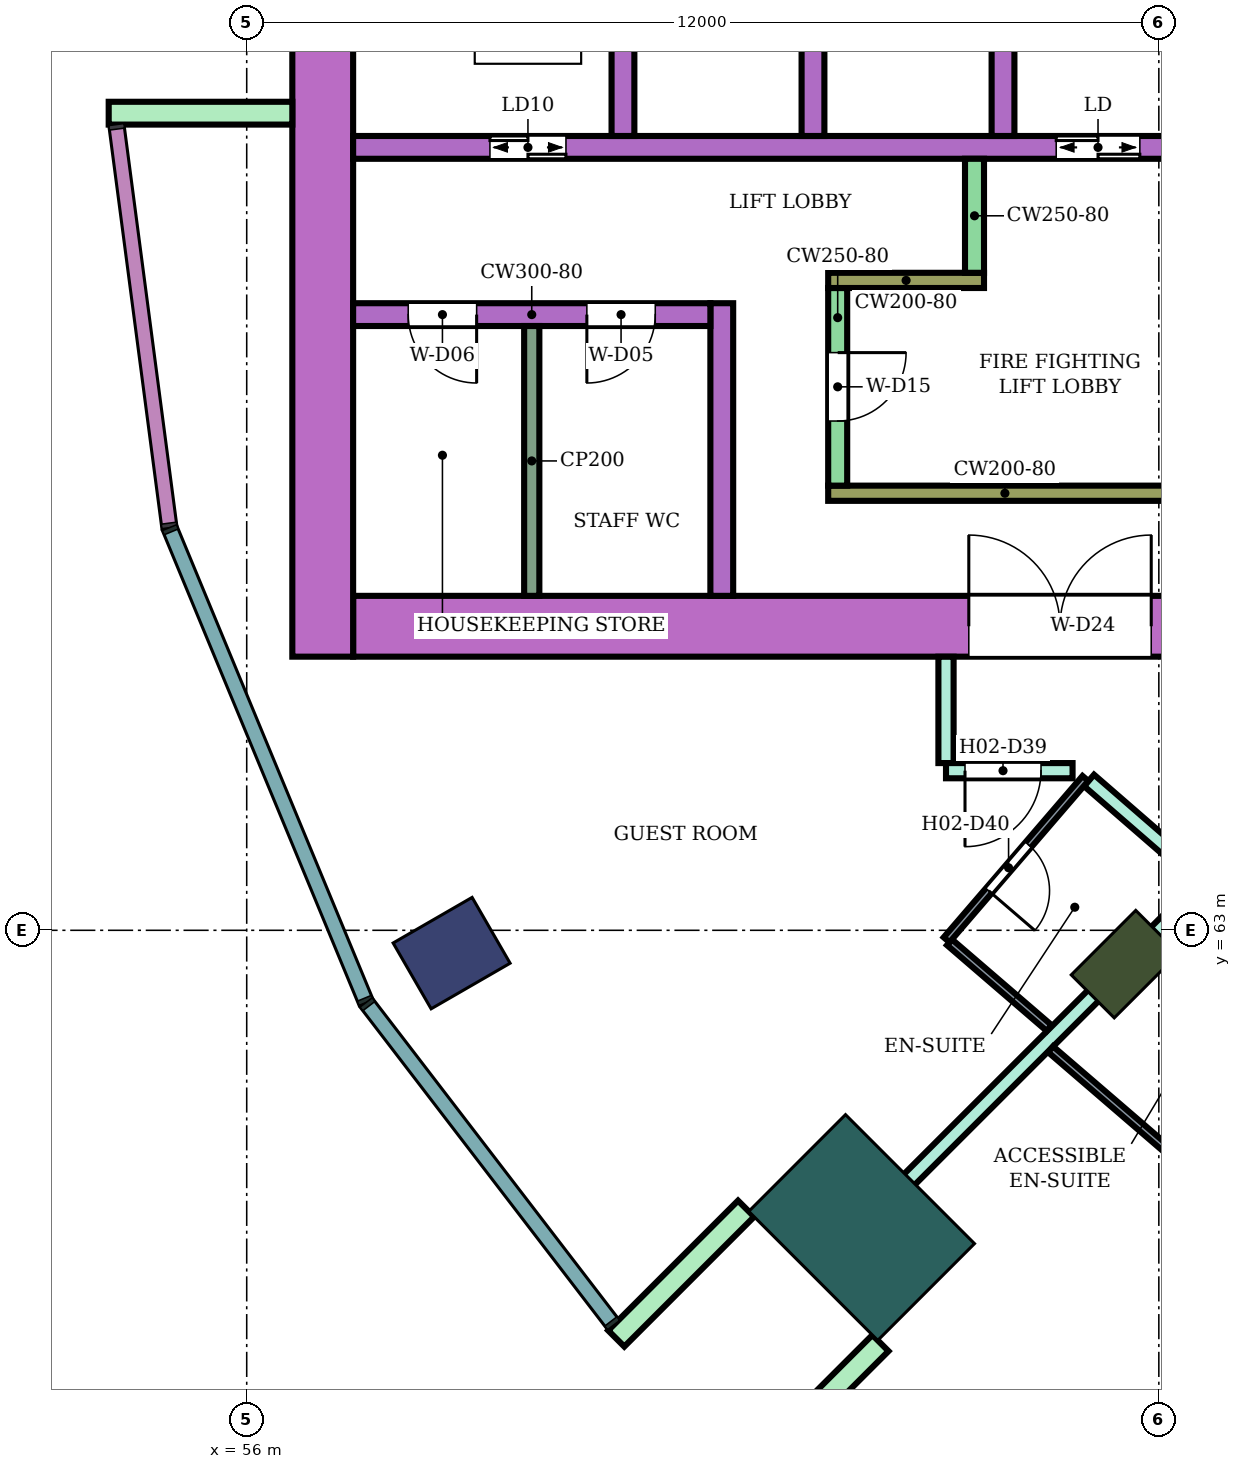
"""IFC4 building model, lengths in metres.
Left out: names, types, materials, properties, quantities, classifications, styles, units other than length and angle.
Written with IfcOpenShell. Run it as: python <this file> out.ifc"""

import sys

from ifc_helpers import new_model, si_unit, direction, frame, frame_2d, origin, origin_2d, place, context, subcontext, project, spatial, rectangle, extrude, element, fill, save


model = new_model("IFC4")
c1 = context("Model", 3, precision=1e-05, world=origin(), true_north=direction((0.0, 1.0)))
c2 = subcontext(c1, "Body", "Model", "MODEL_VIEW")
j1 = project(units=[si_unit("LENGTHUNIT", "METRE"), si_unit("PLANEANGLEUNIT", "RADIAN")], contexts=[c1])
p1 = place(None, origin())
s1 = spatial("IfcSite", under=j1, at=p1, CompositionType="ELEMENT")
p2 = place(p1, origin())
s2 = spatial("IfcBuilding", under=s1, at=p2, CompositionType="ELEMENT")
p3 = place(p2, frame((0.0, 0.0, 44.0)))
s3 = spatial("IfcBuildingStorey", under=s2, at=p3, CompositionType="ELEMENT", Elevation=44.0)
p4 = place(p3, frame((58.696, 62.7, 0.0), z_axis=(0.0, 0.0, 1.0), x_axis=(-0.866025403784, -0.5, 0.0)))
e1 = element("IfcColumn", 1, at=p4, inside=s3, PredefinedType="COLUMN", context=c2, shape_type="SweptSolid", body=[
    extrude(rectangle(XDim=1.2, YDim=1.0, at=origin_2d()), origin(), (0.0, 0.0, 1.0), 3.8),
])
p5 = place(p3, frame((67.555, 62.555, 0.0), z_axis=(0.0, 0.0, 1.0), x_axis=(-0.707106781187, -0.707106781187, 0.0)))
e2 = element("IfcColumn", 2, at=p5, inside=s3, PredefinedType="COLUMN", context=c2, shape_type="SweptSolid", body=[
    extrude(rectangle(XDim=1.2, YDim=0.8, at=origin_2d()), origin(), (0.0, 0.0, 1.0), 3.8),
])
p6 = place(p3, frame((64.09, 59.09, 0.0), z_axis=(0.0, 0.0, 1.0), x_axis=(-0.707106781187, -0.707106781187, 0.0)))
e3 = element("IfcColumn", 3, at=p6, inside=s3, PredefinedType="COLUMN", context=c2, shape_type="SweptSolid", body=[
    extrude(rectangle(XDim=1.8, YDim=2.4, at=origin_2d()), origin(), (0.0, 0.0, 1.0), 3.8),
])
p7 = place(p3, frame((72.1, 67.0, 0.0), z_axis=(0.0, 0.0, 1.0), x_axis=(-1.0, 0.0, 0.0)))
e4 = element("IfcWall", 4, at=p7, inside=s3, PredefinedType="SHEAR", context=c2, shape_type="SweptSolid", body=[
    extrude(rectangle(XDim=14.7, YDim=0.8, at=frame_2d((7.35, 0.0))), origin(), (0.0, 0.0, 1.0), 3.48),
])
p8 = place(p7, frame((4.2, 0.0, 0.0)))
e5 = element("IfcOpeningElement", 5, at=p8, cuts=e4, PredefinedType="OPENING", context=c2, shape_type="SweptSolid", body=[
    extrude(rectangle(XDim=2.4, YDim=2.4, at=frame_2d((1.2, 1.2))), frame((0.0, 0.41, 0.0), z_axis=(0.0, -1.0, 0.0), x_axis=(1.0, 0.0, 0.0)), (0.0, 0.0, 1.0), 0.82),
])
p9 = place(p3, frame((57.0, 83.4, 0.0), z_axis=(0.0, 0.0, 1.0), x_axis=(0.0, -1.0, 0.0)))
e6 = element("IfcWall", 6, at=p9, inside=s3, PredefinedType="SHEAR", context=c2, shape_type="SweptSolid", body=[
    extrude(rectangle(XDim=16.8, YDim=0.8, at=frame_2d((8.4, 0.0))), origin(), (0.0, 0.0, 1.0), 3.48),
])
p10 = place(p3, frame((68.3, 73.3, 0.0), z_axis=(0.0, 0.0, 1.0), x_axis=(-1.0, 0.0, 0.0)))
e7 = element("IfcWall", 7, at=p10, inside=s3, PredefinedType="SHEAR", context=c2, shape_type="SweptSolid", body=[
    extrude(rectangle(XDim=10.9, YDim=0.3, at=frame_2d((5.45, 0.0))), origin(), (0.0, 0.0, 1.0), 3.48),
])
p11 = place(p10, frame((0.55, 0.0, 0.0)))
e8 = element("IfcOpeningElement", 8, at=p11, cuts=e7, PredefinedType="OPENING", context=c2, shape_type="SweptSolid", body=[
    extrude(rectangle(XDim=1.1, YDim=2.1, at=frame_2d((0.55, 1.05))), frame((0.0, 0.16, 0.0), z_axis=(0.0, -1.0, 0.0), x_axis=(1.0, 0.0, 0.0)), (0.0, 0.0, 1.0), 0.32),
])
p12 = place(p10, frame((8.1, 0.0, 0.0)))
e9 = element("IfcOpeningElement", 9, at=p12, cuts=e7, PredefinedType="OPENING", context=c2, shape_type="SweptSolid", body=[
    extrude(rectangle(XDim=1.0, YDim=2.1, at=frame_2d((0.5, 1.05))), frame((0.0, 0.16, 0.0), z_axis=(0.0, -1.0, 0.0), x_axis=(1.0, 0.0, 0.0)), (0.0, 0.0, 1.0), 0.32),
])
for number, where, z_axis, x_axis in (
    (10, (65.95, 76.0, 0.0), (0.0, 0.0, 1.0), (0.0, -1.0, 0.0)),
    (11, (63.45, 76.0, 0.0), (0.0, 0.0, 1.0), (0.0, -1.0, 0.0)),
    (12, (60.95, 76.0, 0.0), (0.0, 0.0, 1.0), (0.0, -1.0, 0.0)),
):
    element("IfcWall", number, at=place(p3, frame(where, z_axis=z_axis, x_axis=x_axis)), inside=s3, PredefinedType="SHEAR", context=c2, shape_type="SweptSolid", body=[
        extrude(rectangle(XDim=2.55, YDim=0.3, at=frame_2d((1.275, 0.0))), origin(), (0.0, 0.0, 1.0), 3.48),
    ])
p13 = place(p3, frame((68.3, 68.75, 0.0), z_axis=(0.0, 0.0, 1.0), x_axis=(-1.0, 0.0, 0.0)))
e13 = element("IfcWall", 13, at=p13, inside=s3, PredefinedType="SHEAR", context=c2, shape_type="SweptSolid", body=[
    extrude(rectangle(XDim=4.65, YDim=0.2, at=frame_2d((2.325, 0.0))), origin(), (0.0, 0.0, 1.0), 3.48),
])
p14 = place(p3, frame((63.775, 71.45, 0.0), z_axis=(0.0, 0.0, 1.0), x_axis=(0.0, -1.0, 0.0)))
e14 = element("IfcWall", 14, at=p14, inside=s3, PredefinedType="SHEAR", context=c2, shape_type="SweptSolid", body=[
    extrude(rectangle(XDim=2.6, YDim=0.25, at=frame_2d((1.3, 0.0))), origin(), (0.0, 0.0, 1.0), 3.48),
])
p15 = place(p14, frame((0.85, 0.0, 0.0)))
e15 = element("IfcOpeningElement", 15, at=p15, cuts=e14, PredefinedType="OPENING", context=c2, shape_type="SweptSolid", body=[
    extrude(rectangle(XDim=0.9, YDim=2.1, at=frame_2d((0.45, 1.05))), frame((0.0, 0.135, 0.0), z_axis=(0.0, -1.0, 0.0), x_axis=(1.0, 0.0, 0.0)), (0.0, 0.0, 1.0), 0.27),
])
p16 = place(p3, frame((65.7, 71.55, 0.0), z_axis=(0.0, 0.0, 1.0), x_axis=(-1.0, 0.0, 0.0)))
e16 = element("IfcWall", 16, at=p16, inside=s3, PredefinedType="SHEAR", context=c2, shape_type="SweptSolid", body=[
    extrude(rectangle(XDim=2.05, YDim=0.2, at=frame_2d((1.025, 0.0))), origin(), (0.0, 0.0, 1.0), 3.48),
])
p17 = place(p3, frame((65.575, 73.15, 0.0), z_axis=(0.0, 0.0, 1.0), x_axis=(0.0, -1.0, 0.0)))
e17 = element("IfcWall", 17, at=p17, inside=s3, PredefinedType="SHEAR", context=c2, shape_type="SweptSolid", body=[
    extrude(rectangle(XDim=1.5, YDim=0.25, at=frame_2d((0.75, 0.0))), origin(), (0.0, 0.0, 1.0), 3.48),
])
p18 = place(p3, frame((62.25, 71.25, 0.0), z_axis=(0.0, 0.0, 1.0), x_axis=(0.0, -1.0, 0.0)))
e18 = element("IfcWall", 18, at=p18, inside=s3, PredefinedType="SHEAR", context=c2, shape_type="SweptSolid", body=[
    extrude(rectangle(XDim=3.85, YDim=0.3, at=frame_2d((1.925, 0.0))), origin(), (0.0, 0.0, 1.0), 3.48),
])
p19 = place(p3, frame((62.1, 71.1, 0.0), z_axis=(0.0, 0.0, 1.0), x_axis=(-1.0, 0.0, 0.0)))
e19 = element("IfcWall", 19, at=p19, inside=s3, PredefinedType="SHEAR", context=c2, shape_type="SweptSolid", body=[
    extrude(rectangle(XDim=4.7, YDim=0.3, at=frame_2d((2.35, 0.0))), origin(), (0.0, 0.0, 1.0), 3.48),
])
p20 = place(p19, frame((0.725, 0.0, 0.0)))
e20 = element("IfcOpeningElement", 20, at=p20, cuts=e19, PredefinedType="OPENING", context=c2, shape_type="SweptSolid", body=[
    extrude(rectangle(XDim=0.9, YDim=2.1, at=frame_2d((0.45, 1.05))), frame((0.0, 0.16, 0.0), z_axis=(0.0, -1.0, 0.0), x_axis=(1.0, 0.0, 0.0)), (0.0, 0.0, 1.0), 0.32),
])
p21 = place(p19, frame((3.075, 0.0, 0.0)))
e21 = element("IfcOpeningElement", 21, at=p21, cuts=e19, PredefinedType="OPENING", context=c2, shape_type="SweptSolid", body=[
    extrude(rectangle(XDim=0.9, YDim=2.1, at=frame_2d((0.45, 1.05))), frame((0.0, 0.16, 0.0), z_axis=(0.0, -1.0, 0.0), x_axis=(1.0, 0.0, 0.0)), (0.0, 0.0, 1.0), 0.32),
])
for number, where, z_axis, x_axis in (
    (22, (56.6, 73.75, 0.0), (0.0, 0.0, 1.0), (-1.0, 0.0, 0.0)),
    (23, (62.57, 59.338, 0.0), (0.0, 0.0, 1.0), (-0.707, -0.707, 0.0)),
    (24, (64.338, 57.57, 0.0), (0.0, 0.0, 1.0), (-0.707, -0.707, 0.0)),
):
    element("IfcWall", number, at=place(p3, frame(where, z_axis=z_axis, x_axis=x_axis)), inside=s3, PredefinedType="NOTDEFINED", context=c2, shape_type="SweptSolid", body=[
        extrude(rectangle(XDim=2.416, YDim=0.3, at=frame_2d((1.208, 0.0))), origin(), (0.0, 0.0, 1.0), 3.8),
    ])
p22 = place(p3, frame((63.594, 58.598, 0.0), z_axis=(0.0, 0.0, 1.0), x_axis=(0.707228748718, 0.706984792613, 0.0)))
e25 = element("IfcWall", 25, at=p22, inside=s3, PredefinedType="PARTITIONING", context=c2, shape_type="SweptSolid", body=[
    extrude(rectangle(XDim=7.005, YDim=0.2, at=frame_2d((3.503, 0.0))), origin(), (0.0, 0.0, 1.0), 3.35),
])
p23 = place(p3, frame((65.2, 65.2, 0.0), z_axis=(0.0, 0.0, 1.0), x_axis=(0.0, 1.0, 0.0)))
e26 = element("IfcWall", 26, at=p23, inside=s3, PredefinedType="PARTITIONING", context=c2, shape_type="SweptSolid", body=[
    extrude(rectangle(XDim=1.399, YDim=0.2, at=frame_2d((0.7, 0.0))), origin(), (0.0, 0.0, 1.0), 3.35),
])
p24 = place(p3, frame((65.2, 65.1, 0.0), z_axis=(0.0, 0.0, 1.0), x_axis=(1.0, 0.0, 0.0)))
e27 = element("IfcWall", 27, at=p24, inside=s3, PredefinedType="PARTITIONING", context=c2, shape_type="SweptSolid", body=[
    extrude(rectangle(XDim=1.665, YDim=0.2, at=frame_2d((0.833, 0.0))), origin(), (0.0, 0.0, 1.0), 3.35),
])
p25 = place(p24, frame((0.25, 0.0, 0.0)))
e28 = element("IfcOpeningElement", 28, at=p25, cuts=e27, PredefinedType="OPENING", context=c2, shape_type="SweptSolid", body=[
    extrude(rectangle(XDim=1.0, YDim=2.1, at=frame_2d((0.5, 1.05))), frame((0.0, 0.11, 0.0), z_axis=(0.0, -1.0, 0.0), x_axis=(1.0, 0.0, 0.0)), (0.0, 0.0, 1.0), 0.22),
])
p26 = place(p3, frame((67.082, 64.972, 0.0), z_axis=(0.0, 0.0, 1.0), x_axis=(0.755033632617, -0.655686063309, 0.0)))
e29 = element("IfcWall", 29, at=p26, inside=s3, PredefinedType="PARTITIONING", context=c2, shape_type="SweptSolid", body=[
    extrude(rectangle(XDim=6.185, YDim=0.2, at=frame_2d((3.093, 0.0))), origin(), (0.0, 0.0, 1.0), 3.35),
])
p27 = place(p26, frame((4.778, 0.0, 0.0)))
e30 = element("IfcOpeningElement", 30, at=p27, cuts=e29, PredefinedType="OPENING", context=c2, shape_type="SweptSolid", body=[
    extrude(rectangle(XDim=1.1, YDim=2.1, at=frame_2d((0.55, 1.05))), frame((0.0, 0.11, 0.0), z_axis=(0.0, -1.0, 0.0), x_axis=(1.0, 0.0, 0.0)), (0.0, 0.0, 1.0), 0.22),
])
p28 = place(p3, frame((67.094, 52.663, 0.0), z_axis=(0.0, 0.0, 1.0), x_axis=(0.500216854217, 0.865900166738, 0.0)))
e31 = element("IfcWall", 31, at=p28, inside=s3, PredefinedType="PARTITIONING", context=c2, shape_type="SweptSolid", body=[
    extrude(rectangle(XDim=9.375, YDim=0.2, at=frame_2d((4.688, 0.0))), origin(), (0.0, 0.0, 1.0), 3.35),
])
p29 = place(p3, frame((65.246, 62.842, 0.0), z_axis=(0.0, 0.0, 1.0), x_axis=(0.758030338995, -0.652219292234, 0.0)))
e32 = element("IfcWall", 32, at=p29, inside=s3, PredefinedType="PARTITIONING", context=c2, shape_type="SweptSolid", body=[
    extrude(rectangle(XDim=1.73, YDim=0.1, at=frame_2d((0.865, 0.0))), origin(), (0.0, 0.0, 1.0), 3.35),
])
p30 = place(p3, frame((65.208, 62.875, 0.0), z_axis=(0.0, 0.0, 1.0), x_axis=(0.65205430601, 0.758172264076, 0.0)))
e33 = element("IfcWall", 33, at=p30, inside=s3, PredefinedType="PARTITIONING", context=c2, shape_type="SweptSolid", body=[
    extrude(rectangle(XDim=2.8, YDim=0.1, at=frame_2d((1.4, 0.0))), origin(), (0.0, 0.0, 1.0), 3.35),
])
p31 = place(p30, frame((0.85, 0.0, 0.0)))
e34 = element("IfcOpeningElement", 34, at=p31, cuts=e33, PredefinedType="OPENING", context=c2, shape_type="SweptSolid", body=[
    extrude(rectangle(XDim=0.8, YDim=2.1, at=frame_2d((0.4, 1.05))), frame((0.0, 0.06, 0.0), z_axis=(0.0, -1.0, 0.0), x_axis=(1.0, 0.0, 0.0)), (0.0, 0.0, 1.0), 0.12),
])
p32 = place(p3, frame((66.576, 61.435, 0.0), z_axis=(0.0, 0.0, 1.0), x_axis=(0.757970550281, -0.652288774169, 0.0)))
e35 = element("IfcWall", 35, at=p32, inside=s3, PredefinedType="PARTITIONING", context=c2, shape_type="SweptSolid", body=[
    extrude(rectangle(XDim=2.576, YDim=0.1, at=frame_2d((1.288, 0.0))), origin(), (0.0, 0.0, 1.0), 3.35),
])
p33 = place(p3, frame((59.75, 70.95, 0.0), z_axis=(0.0, 0.0, 1.0), x_axis=(0.0, -1.0, 0.0)))
e36 = element("IfcWall", 36, at=p33, inside=s3, PredefinedType="PARTITIONING", context=c2, shape_type="SweptSolid", body=[
    extrude(rectangle(XDim=3.55, YDim=0.2, at=frame_2d((1.775, 0.0))), origin(), (0.0, 0.0, 1.0), 3.48),
])
p34 = place(p25, frame((1.0, 0.0, 0.0), z_axis=(0.0, 0.0, 1.0), x_axis=(-1.0, 0.0, 0.0)))
e37 = element("IfcDoor", 37, at=p34, inside=s3, OperationType="SINGLE_SWING_RIGHT", PredefinedType="DOOR", context=c2, shape_type="SweptSolid", body=[
    extrude(rectangle(XDim=1.0, YDim=2.1, at=frame_2d((0.5, 1.05))), frame((0.0, 0.025, 0.0), z_axis=(0.0, -1.0, 0.0), x_axis=(1.0, 0.0, 0.0)), (0.0, 0.0, 1.0), 0.05),
])
fill(e28, e37)
p35 = place(p31, frame((0.8, 0.0, 0.0), z_axis=(0.0, 0.0, 1.0), x_axis=(-1.0, 0.0, 0.0)))
e38 = element("IfcDoor", 38, at=p35, inside=s3, OperationType="SINGLE_SWING_RIGHT", PredefinedType="DOOR", context=c2, shape_type="SweptSolid", body=[
    extrude(rectangle(XDim=0.8, YDim=2.1, at=frame_2d((0.4, 1.05))), frame((0.0, 0.025, 0.0), z_axis=(0.0, -1.0, 0.0), x_axis=(1.0, 0.0, 0.0)), (0.0, 0.0, 1.0), 0.05),
])
fill(e34, e38)
p36 = place(p11, origin())
e39 = element("IfcDoor", 39, at=p36, inside=s3, OperationType="DOUBLE_DOOR_SLIDING", PredefinedType="DOOR", context=c2, shape_type="SweptSolid", body=[
    extrude(rectangle(XDim=1.1, YDim=2.1, at=frame_2d((0.55, 1.05))), frame((0.0, 0.025, 0.0), z_axis=(0.0, -1.0, 0.0), x_axis=(1.0, 0.0, 0.0)), (0.0, 0.0, 1.0), 0.05),
])
fill(e8, e39)
p37 = place(p12, origin())
e40 = element("IfcDoor", 40, at=p37, inside=s3, OperationType="DOUBLE_DOOR_SLIDING", PredefinedType="DOOR", context=c2, shape_type="SweptSolid", body=[
    extrude(rectangle(XDim=1.0, YDim=2.1, at=frame_2d((0.5, 1.05))), frame((0.0, 0.025, 0.0), z_axis=(0.0, -1.0, 0.0), x_axis=(1.0, 0.0, 0.0)), (0.0, 0.0, 1.0), 0.05),
])
fill(e9, e40)
p38 = place(p15, origin())
e41 = element("IfcDoor", 41, at=p38, inside=s3, OperationType="SINGLE_SWING_LEFT", PredefinedType="DOOR", context=c2, shape_type="SweptSolid", body=[
    extrude(rectangle(XDim=0.9, YDim=2.1, at=frame_2d((0.45, 1.05))), frame((0.0, 0.025, 0.0), z_axis=(0.0, -1.0, 0.0), x_axis=(1.0, 0.0, 0.0)), (0.0, 0.0, 1.0), 0.05),
])
fill(e15, e41)
p39 = place(p20, origin())
e42 = element("IfcDoor", 42, at=p39, inside=s3, OperationType="SINGLE_SWING_RIGHT", PredefinedType="DOOR", context=c2, shape_type="SweptSolid", body=[
    extrude(rectangle(XDim=0.9, YDim=2.1, at=frame_2d((0.45, 1.05))), frame((0.0, 0.025, 0.0), z_axis=(0.0, -1.0, 0.0), x_axis=(1.0, 0.0, 0.0)), (0.0, 0.0, 1.0), 0.05),
])
fill(e20, e42)
p40 = place(p21, origin())
e43 = element("IfcDoor", 43, at=p40, inside=s3, OperationType="SINGLE_SWING_LEFT", PredefinedType="DOOR", context=c2, shape_type="SweptSolid", body=[
    extrude(rectangle(XDim=0.9, YDim=2.1, at=frame_2d((0.45, 1.05))), frame((0.0, 0.025, 0.0), z_axis=(0.0, -1.0, 0.0), x_axis=(1.0, 0.0, 0.0)), (0.0, 0.0, 1.0), 0.05),
])
fill(e21, e43)
p41 = place(p8, frame((2.4, 0.0, 0.0), z_axis=(0.0, 0.0, 1.0), x_axis=(-1.0, 0.0, 0.0)))
e44 = element("IfcDoor", 44, at=p41, inside=s3, OperationType="DOUBLE_DOOR_SINGLE_SWING", PredefinedType="DOOR", context=c2, shape_type="SweptSolid", body=[
    extrude(rectangle(XDim=2.4, YDim=2.4, at=frame_2d((1.2, 1.2))), frame((0.0, 0.025, 0.0), z_axis=(0.0, -1.0, 0.0), x_axis=(1.0, 0.0, 0.0)), (0.0, 0.0, 1.0), 0.05),
])
fill(e5, e44)
save(model, sys.argv[1])
